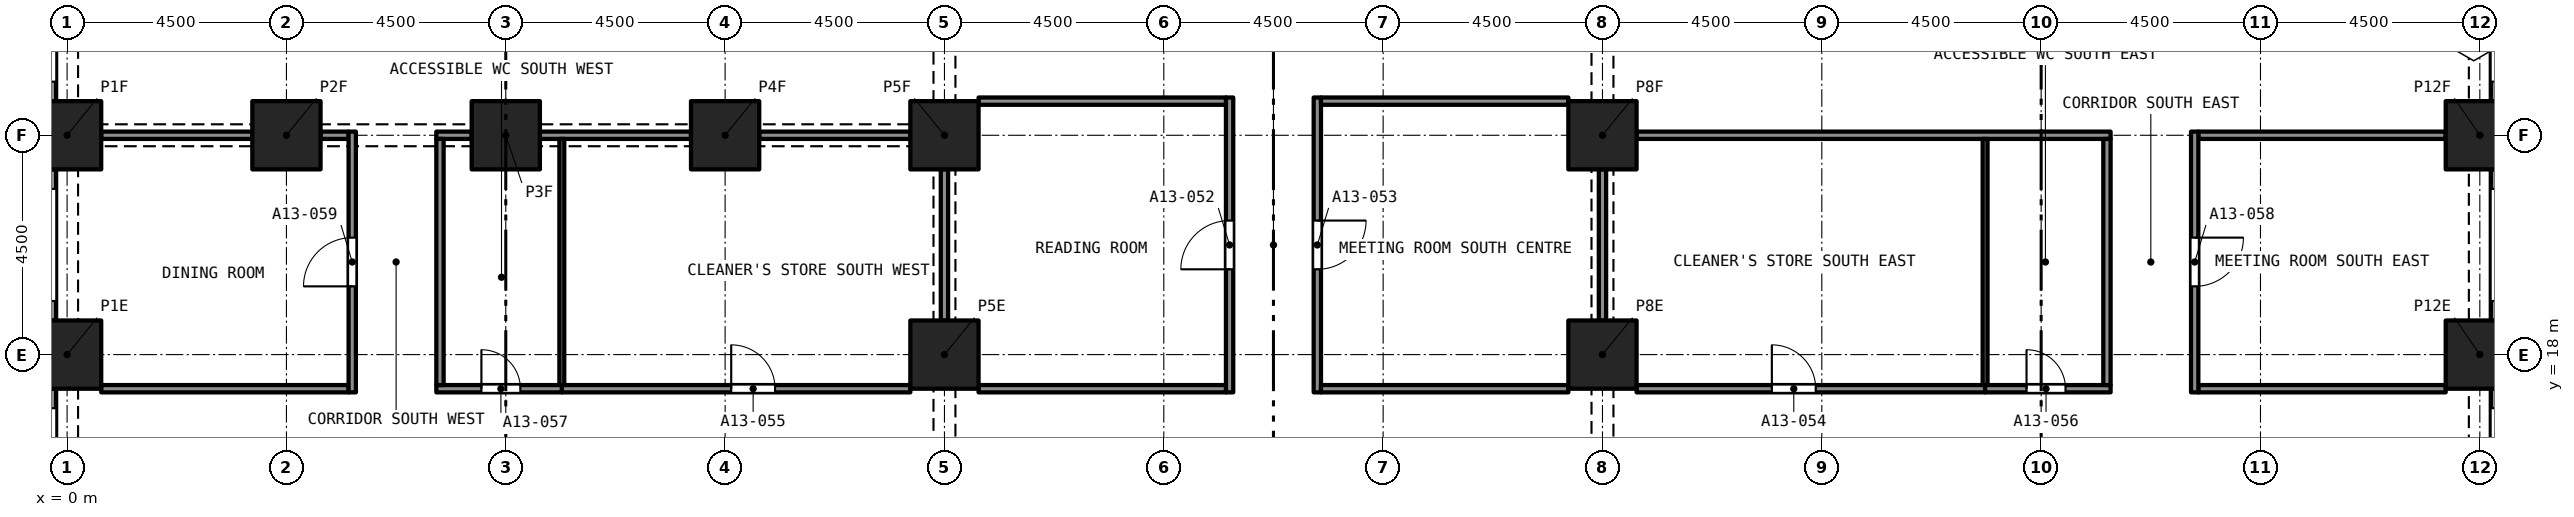
"""IFC4 building model, lengths in metres.
Left out: names, types, materials, properties, quantities, classifications, styles, units other than length and angle.
Written with IfcOpenShell. Run it as: python <this file> out.ifc"""

import sys

from ifc_helpers import new_model, si_unit, direction, frame, frame_2d, origin, origin_2d, place, context, subcontext, project, spatial, rectangle, extrude, element, fill, save


model = new_model("IFC4")
c1 = context("Model", 3, precision=1e-05, world=origin(), true_north=direction((0.0, 1.0)))
c2 = subcontext(c1, "Body", "Model", "MODEL_VIEW")
j1 = project(units=[si_unit("LENGTHUNIT", "METRE"), si_unit("PLANEANGLEUNIT", "RADIAN")], contexts=[c1])
p1 = place(None, origin())
s1 = spatial("IfcSite", under=j1, at=p1, CompositionType="ELEMENT")
p2 = place(p1, origin())
s2 = spatial("IfcBuilding", under=s1, at=p2, CompositionType="ELEMENT")
p3 = place(p2, frame((0.0, 0.0, 52.8)))
s3 = spatial("IfcBuildingStorey", under=s2, at=p3, CompositionType="ELEMENT", Elevation=52.8)
for number, where, z_axis, x_axis in (
    (1, (0.0, 18.0, 0.0), (0.0, 0.0, 1.0), (1.0, 0.0, 0.0)),
    (2, (18.0, 18.0, 0.0), (0.0, 0.0, 1.0), (1.0, 0.0, 0.0)),
    (3, (31.5, 18.0, 0.0), (0.0, 0.0, 1.0), (1.0, 0.0, 0.0)),
    (4, (49.5, 18.0, 0.0), (0.0, 0.0, 1.0), (1.0, 0.0, 0.0)),
    (5, (0.0, 22.5, 0.0), (0.0, 0.0, 1.0), (1.0, 0.0, 0.0)),
    (6, (4.5, 22.5, 0.0), (0.0, 0.0, 1.0), (1.0, 0.0, 0.0)),
    (7, (9.0, 22.5, 0.0), (0.0, 0.0, 1.0), (1.0, 0.0, 0.0)),
    (8, (13.5, 22.5, 0.0), (0.0, 0.0, 1.0), (1.0, 0.0, 0.0)),
    (9, (18.0, 22.5, 0.0), (0.0, 0.0, 1.0), (1.0, 0.0, 0.0)),
    (10, (31.5, 22.5, 0.0), (0.0, 0.0, 1.0), (1.0, 0.0, 0.0)),
    (11, (49.5, 22.5, 0.0), (0.0, 0.0, 1.0), (1.0, 0.0, 0.0)),
):
    element("IfcColumn", number, at=place(p3, frame(where, z_axis=z_axis, x_axis=x_axis)), inside=s3, PredefinedType="COLUMN", context=c2, shape_type="SweptSolid", body=[
        extrude(rectangle(XDim=1.4, YDim=1.4, at=origin_2d()), origin(), (0.0, 0.0, 1.0), 3.2),
    ])
p4 = place(p3, frame((49.875, 17.3, 0.0), z_axis=(0.0, 0.0, 1.0), x_axis=(0.0, -1.0, 0.0)))
e12 = element("IfcWall", 12, at=p4, inside=s3, PredefinedType="SOLIDWALL", context=c2, shape_type="SweptSolid", body=[
    extrude(rectangle(XDim=3.1, YDim=0.3, at=frame_2d((1.55, 0.0))), origin(), (0.0, 0.0, 1.0), 3.2),
])
p5 = place(p4, frame((0.4, 0.0, 0.45)))
e13 = element("IfcOpeningElement", 13, at=p5, cuts=e12, PredefinedType="OPENING", context=c2, shape_type="SweptSolid", body=[
    extrude(rectangle(XDim=2.3, YDim=1.95, at=frame_2d((1.15, 0.975))), frame((0.0, 0.16, 0.0), z_axis=(0.0, -1.0, 0.0), x_axis=(1.0, 0.0, 0.0)), (0.0, 0.0, 1.0), 0.32),
])
p6 = place(p3, frame((49.875, 21.8, 0.0), z_axis=(0.0, 0.0, 1.0), x_axis=(0.0, -1.0, 0.0)))
e14 = element("IfcWall", 14, at=p6, inside=s3, PredefinedType="SOLIDWALL", context=c2, shape_type="SweptSolid", body=[
    extrude(rectangle(XDim=3.1, YDim=0.3, at=frame_2d((1.55, 0.0))), origin(), (0.0, 0.0, 1.0), 3.2),
])
p7 = place(p6, frame((0.4, 0.0, 0.45)))
e15 = element("IfcOpeningElement", 15, at=p7, cuts=e14, PredefinedType="OPENING", context=c2, shape_type="SweptSolid", body=[
    extrude(rectangle(XDim=2.3, YDim=1.95, at=frame_2d((1.15, 0.975))), frame((0.0, 0.16, 0.0), z_axis=(0.0, -1.0, 0.0), x_axis=(1.0, 0.0, 0.0)), (0.0, 0.0, 1.0), 0.32),
])
p8 = place(p3, frame((49.875, 26.3, 0.0), z_axis=(0.0, 0.0, 1.0), x_axis=(0.0, -1.0, 0.0)))
e16 = element("IfcWall", 16, at=p8, inside=s3, PredefinedType="SOLIDWALL", context=c2, shape_type="SweptSolid", body=[
    extrude(rectangle(XDim=3.1, YDim=0.3, at=frame_2d((1.55, 0.0))), origin(), (0.0, 0.0, 1.0), 3.2),
])
p9 = place(p8, frame((0.4, 0.0, 0.45)))
e17 = element("IfcOpeningElement", 17, at=p9, cuts=e16, PredefinedType="OPENING", context=c2, shape_type="SweptSolid", body=[
    extrude(rectangle(XDim=2.3, YDim=1.95, at=frame_2d((1.15, 0.975))), frame((0.0, 0.16, 0.0), z_axis=(0.0, -1.0, 0.0), x_axis=(1.0, 0.0, 0.0)), (0.0, 0.0, 1.0), 0.32),
])
p10 = place(p3, frame((-0.375, 23.2, 0.0), z_axis=(0.0, 0.0, 1.0), x_axis=(0.0, 1.0, 0.0)))
e18 = element("IfcWall", 18, at=p10, inside=s3, PredefinedType="SOLIDWALL", context=c2, shape_type="SweptSolid", body=[
    extrude(rectangle(XDim=3.1, YDim=0.3, at=frame_2d((1.55, 0.0))), origin(), (0.0, 0.0, 1.0), 3.2),
])
p11 = place(p10, frame((0.4, 0.0, 0.45)))
e19 = element("IfcOpeningElement", 19, at=p11, cuts=e18, PredefinedType="OPENING", context=c2, shape_type="SweptSolid", body=[
    extrude(rectangle(XDim=2.3, YDim=1.95, at=frame_2d((1.15, 0.975))), frame((0.0, 0.16, 0.0), z_axis=(0.0, -1.0, 0.0), x_axis=(1.0, 0.0, 0.0)), (0.0, 0.0, 1.0), 0.32),
])
p12 = place(p3, frame((-0.375, 18.7, 0.0), z_axis=(0.0, 0.0, 1.0), x_axis=(0.0, 1.0, 0.0)))
e20 = element("IfcWall", 20, at=p12, inside=s3, PredefinedType="SOLIDWALL", context=c2, shape_type="SweptSolid", body=[
    extrude(rectangle(XDim=3.1, YDim=0.3, at=frame_2d((1.55, 0.0))), origin(), (0.0, 0.0, 1.0), 3.2),
])
p13 = place(p12, frame((0.4, 0.0, 0.45)))
e21 = element("IfcOpeningElement", 21, at=p13, cuts=e20, PredefinedType="OPENING", context=c2, shape_type="SweptSolid", body=[
    extrude(rectangle(XDim=2.3, YDim=1.95, at=frame_2d((1.15, 0.975))), frame((0.0, 0.16, 0.0), z_axis=(0.0, -1.0, 0.0), x_axis=(1.0, 0.0, 0.0)), (0.0, 0.0, 1.0), 0.32),
])
p14 = place(p3, frame((-0.375, 14.2, 0.0), z_axis=(0.0, 0.0, 1.0), x_axis=(0.0, 1.0, 0.0)))
e22 = element("IfcWall", 22, at=p14, inside=s3, PredefinedType="SOLIDWALL", context=c2, shape_type="SweptSolid", body=[
    extrude(rectangle(XDim=3.1, YDim=0.3, at=frame_2d((1.55, 0.0))), origin(), (0.0, 0.0, 1.0), 3.2),
])
p15 = place(p14, frame((0.4, 0.0, 0.45)))
e23 = element("IfcOpeningElement", 23, at=p15, cuts=e22, PredefinedType="OPENING", context=c2, shape_type="SweptSolid", body=[
    extrude(rectangle(XDim=2.3, YDim=1.95, at=frame_2d((1.15, 0.975))), frame((0.0, 0.16, 0.0), z_axis=(0.0, -1.0, 0.0), x_axis=(1.0, 0.0, 0.0)), (0.0, 0.0, 1.0), 0.32),
])
p16 = place(p3, frame((23.85, 17.225, 0.0), z_axis=(0.0, 0.0, 1.0), x_axis=(0.0, 1.0, 0.0)))
e24 = element("IfcWall", 24, at=p16, inside=s3, PredefinedType="PARTITIONING", context=c2, shape_type="SweptSolid", body=[
    extrude(rectangle(XDim=6.05, YDim=0.15, at=frame_2d((3.025, 0.0))), origin(), (0.0, 0.0, 1.0), 2.75),
])
p17 = place(p16, frame((2.525, 0.0, 0.0)))
e25 = element("IfcOpeningElement", 25, at=p17, cuts=e24, PredefinedType="OPENING", context=c2, shape_type="SweptSolid", body=[
    extrude(rectangle(XDim=1.0, YDim=2.1, at=frame_2d((0.5, 1.05))), frame((0.0, 0.085, 0.0), z_axis=(0.0, -1.0, 0.0), x_axis=(1.0, 0.0, 0.0)), (0.0, 0.0, 1.0), 0.17),
])
p18 = place(p3, frame((25.65, 23.275, 0.0), z_axis=(0.0, 0.0, 1.0), x_axis=(0.0, -1.0, 0.0)))
e26 = element("IfcWall", 26, at=p18, inside=s3, PredefinedType="PARTITIONING", context=c2, shape_type="SweptSolid", body=[
    extrude(rectangle(XDim=6.05, YDim=0.15, at=frame_2d((3.025, 0.0))), origin(), (0.0, 0.0, 1.0), 2.75),
])
p19 = place(p18, frame((2.525, 0.0, 0.0)))
e27 = element("IfcOpeningElement", 27, at=p19, cuts=e26, PredefinedType="OPENING", context=c2, shape_type="SweptSolid", body=[
    extrude(rectangle(XDim=1.0, YDim=2.1, at=frame_2d((0.5, 1.05))), frame((0.0, 0.085, 0.0), z_axis=(0.0, -1.0, 0.0), x_axis=(1.0, 0.0, 0.0)), (0.0, 0.0, 1.0), 0.17),
])
for number, where, z_axis, x_axis in (
    (28, (18.7, 17.3, 0.0), (0.0, 0.0, 1.0), (1.0, 0.0, 0.0)),
    (29, (25.725, 17.3, 0.0), (0.0, 0.0, 1.0), (1.0, 0.0, 0.0)),
):
    element("IfcWall", number, at=place(p3, frame(where, z_axis=z_axis, x_axis=x_axis)), inside=s3, PredefinedType="PARTITIONING", context=c2, shape_type="SweptSolid", body=[
        extrude(rectangle(XDim=5.075, YDim=0.15, at=frame_2d((2.538, 0.0))), origin(), (0.0, 0.0, 1.0), 2.75),
    ])
p20 = place(p3, frame((32.2, 17.3, 0.0), z_axis=(0.0, 0.0, 1.0), x_axis=(1.0, 0.0, 0.0)))
e30 = element("IfcWall", 30, at=p20, inside=s3, PredefinedType="PARTITIONING", context=c2, shape_type="SweptSolid", body=[
    extrude(rectangle(XDim=7.15, YDim=0.15, at=frame_2d((3.575, 0.0))), origin(), (0.0, 0.0, 1.0), 2.9),
])
p21 = place(p20, frame((2.775, 0.0, 0.0)))
e31 = element("IfcOpeningElement", 31, at=p21, cuts=e30, PredefinedType="OPENING", context=c2, shape_type="SweptSolid", body=[
    extrude(rectangle(XDim=0.9, YDim=2.1, at=frame_2d((0.45, 1.05))), frame((0.0, 0.085, 0.0), z_axis=(0.0, -1.0, 0.0), x_axis=(1.0, 0.0, 0.0)), (0.0, 0.0, 1.0), 0.17),
])
p22 = place(p3, frame((10.15, 17.3, 0.0), z_axis=(0.0, 0.0, 1.0), x_axis=(1.0, 0.0, 0.0)))
e32 = element("IfcWall", 32, at=p22, inside=s3, PredefinedType="PARTITIONING", context=c2, shape_type="SweptSolid", body=[
    extrude(rectangle(XDim=7.15, YDim=0.15, at=frame_2d((3.575, 0.0))), origin(), (0.0, 0.0, 1.0), 2.9),
])
p23 = place(p22, frame((3.475, 0.0, 0.0)))
e33 = element("IfcOpeningElement", 33, at=p23, cuts=e32, PredefinedType="OPENING", context=c2, shape_type="SweptSolid", body=[
    extrude(rectangle(XDim=0.9, YDim=2.1, at=frame_2d((0.45, 1.05))), frame((0.0, 0.085, 0.0), z_axis=(0.0, -1.0, 0.0), x_axis=(1.0, 0.0, 0.0)), (0.0, 0.0, 1.0), 0.17),
])
p24 = place(p3, frame((39.35, 17.3, 0.0), z_axis=(0.0, 0.0, 1.0), x_axis=(1.0, 0.0, 0.0)))
e34 = element("IfcWall", 34, at=p24, inside=s3, PredefinedType="PARTITIONING", context=c2, shape_type="SweptSolid", body=[
    extrude(rectangle(XDim=2.575, YDim=0.15, at=frame_2d((1.288, 0.0))), origin(), (0.0, 0.0, 1.0), 2.9),
])
p25 = place(p24, frame((0.85, 0.0, 0.0)))
e35 = element("IfcOpeningElement", 35, at=p25, cuts=e34, PredefinedType="OPENING", context=c2, shape_type="SweptSolid", body=[
    extrude(rectangle(XDim=0.8, YDim=2.1, at=frame_2d((0.4, 1.05))), frame((0.0, 0.085, 0.0), z_axis=(0.0, -1.0, 0.0), x_axis=(1.0, 0.0, 0.0)), (0.0, 0.0, 1.0), 0.17),
])
p26 = place(p3, frame((7.575, 17.3, 0.0), z_axis=(0.0, 0.0, 1.0), x_axis=(1.0, 0.0, 0.0)))
e36 = element("IfcWall", 36, at=p26, inside=s3, PredefinedType="PARTITIONING", context=c2, shape_type="SweptSolid", body=[
    extrude(rectangle(XDim=2.575, YDim=0.15, at=frame_2d((1.288, 0.0))), origin(), (0.0, 0.0, 1.0), 2.9),
])
p27 = place(p26, frame((0.925, 0.0, 0.0)))
e37 = element("IfcOpeningElement", 37, at=p27, cuts=e36, PredefinedType="OPENING", context=c2, shape_type="SweptSolid", body=[
    extrude(rectangle(XDim=0.8, YDim=2.1, at=frame_2d((0.4, 1.05))), frame((0.0, 0.085, 0.0), z_axis=(0.0, -1.0, 0.0), x_axis=(1.0, 0.0, 0.0)), (0.0, 0.0, 1.0), 0.17),
])
for number, where, z_axis, x_axis in (
    (38, (43.725, 17.3, 0.0), (0.0, 0.0, 1.0), (1.0, 0.0, 0.0)),
    (39, (0.7, 17.3, 0.0), (0.0, 0.0, 1.0), (1.0, 0.0, 0.0)),
):
    element("IfcWall", number, at=place(p3, frame(where, z_axis=z_axis, x_axis=x_axis)), inside=s3, PredefinedType="PARTITIONING", context=c2, shape_type="SweptSolid", body=[
        extrude(rectangle(XDim=5.075, YDim=0.15, at=frame_2d((2.538, 0.0))), origin(), (0.0, 0.0, 1.0), 2.9),
    ])
p28 = place(p3, frame((18.7, 23.2, 0.0), z_axis=(0.0, 0.0, 1.0), x_axis=(1.0, 0.0, 0.0)))
e40 = element("IfcWall", 40, at=p28, inside=s3, PredefinedType="PARTITIONING", context=c2, shape_type="SweptSolid", body=[
    extrude(rectangle(XDim=5.075, YDim=0.15, at=frame_2d((2.538, 0.0))), origin(), (0.0, 0.0, 1.0), 2.75),
])
p29 = place(p3, frame((18.0, 18.7, 0.0), z_axis=(0.0, 0.0, 1.0), x_axis=(0.0, 1.0, 0.0)))
e41 = element("IfcWall", 41, at=p29, inside=s3, PredefinedType="PARTITIONING", context=c2, shape_type="SweptSolid", body=[
    extrude(rectangle(XDim=3.1, YDim=0.15, at=frame_2d((1.55, 0.0))), origin(), (0.0, 0.0, 1.0), 2.38),
])
p30 = place(p3, frame((25.725, 23.2, 0.0), z_axis=(0.0, 0.0, 1.0), x_axis=(1.0, 0.0, 0.0)))
e42 = element("IfcWall", 42, at=p30, inside=s3, PredefinedType="PARTITIONING", context=c2, shape_type="SweptSolid", body=[
    extrude(rectangle(XDim=5.075, YDim=0.15, at=frame_2d((2.538, 0.0))), origin(), (0.0, 0.0, 1.0), 2.75),
])
p31 = place(p3, frame((31.5, 18.7, 0.0), z_axis=(0.0, 0.0, 1.0), x_axis=(0.0, 1.0, 0.0)))
e43 = element("IfcWall", 43, at=p31, inside=s3, PredefinedType="PARTITIONING", context=c2, shape_type="SweptSolid", body=[
    extrude(rectangle(XDim=3.1, YDim=0.15, at=frame_2d((1.55, 0.0))), origin(), (0.0, 0.0, 1.0), 2.38),
])
p32 = place(p3, frame((32.2, 22.5, 0.0), z_axis=(0.0, 0.0, 1.0), x_axis=(1.0, 0.0, 0.0)))
e44 = element("IfcWall", 44, at=p32, inside=s3, PredefinedType="PARTITIONING", context=c2, shape_type="SweptSolid", body=[
    extrude(rectangle(XDim=9.725, YDim=0.15, at=frame_2d((4.863, 0.0))), origin(), (0.0, 0.0, 1.0), 2.9),
])
p33 = place(p3, frame((43.725, 22.5, 0.0), z_axis=(0.0, 0.0, 1.0), x_axis=(1.0, 0.0, 0.0)))
e45 = element("IfcWall", 45, at=p33, inside=s3, PredefinedType="PARTITIONING", context=c2, shape_type="SweptSolid", body=[
    extrude(rectangle(XDim=5.075, YDim=0.15, at=frame_2d((2.538, 0.0))), origin(), (0.0, 0.0, 1.0), 2.9),
])
for number, where, z_axis, x_axis in (
    (46, (14.2, 22.5, 0.0), (0.0, 0.0, 1.0), (1.0, 0.0, 0.0)),
    (47, (9.7, 22.5, 0.0), (0.0, 0.0, 1.0), (1.0, 0.0, 0.0)),
):
    element("IfcWall", number, at=place(p3, frame(where, z_axis=z_axis, x_axis=x_axis)), inside=s3, PredefinedType="PARTITIONING", context=c2, shape_type="SweptSolid", body=[
        extrude(rectangle(XDim=3.1, YDim=0.15, at=frame_2d((1.55, 0.0))), origin(), (0.0, 0.0, 1.0), 2.38),
    ])
p34 = place(p3, frame((7.575, 22.5, 0.0), z_axis=(0.0, 0.0, 1.0), x_axis=(1.0, 0.0, 0.0)))
e48 = element("IfcWall", 48, at=p34, inside=s3, PredefinedType="PARTITIONING", context=c2, shape_type="SweptSolid", body=[
    extrude(rectangle(XDim=0.725, YDim=0.15, at=frame_2d((0.363, 0.0))), origin(), (0.0, 0.0, 1.0), 2.38),
])
p35 = place(p3, frame((5.2, 22.5, 0.0), z_axis=(0.0, 0.0, 1.0), x_axis=(1.0, 0.0, 0.0)))
e49 = element("IfcWall", 49, at=p35, inside=s3, PredefinedType="PARTITIONING", context=c2, shape_type="SweptSolid", body=[
    extrude(rectangle(XDim=0.575, YDim=0.15, at=frame_2d((0.288, 0.0))), origin(), (0.0, 0.0, 1.0), 2.38),
])
p36 = place(p3, frame((0.7, 22.5, 0.0), z_axis=(0.0, 0.0, 1.0), x_axis=(1.0, 0.0, 0.0)))
e50 = element("IfcWall", 50, at=p36, inside=s3, PredefinedType="PARTITIONING", context=c2, shape_type="SweptSolid", body=[
    extrude(rectangle(XDim=3.1, YDim=0.15, at=frame_2d((1.55, 0.0))), origin(), (0.0, 0.0, 1.0), 2.38),
])
p37 = place(p3, frame((41.85, 17.375, 0.0), z_axis=(0.0, 0.0, 1.0), x_axis=(0.0, 1.0, 0.0)))
e51 = element("IfcWall", 51, at=p37, inside=s3, PredefinedType="PARTITIONING", context=c2, shape_type="SweptSolid", body=[
    extrude(rectangle(XDim=5.05, YDim=0.15, at=frame_2d((2.525, 0.0))), origin(), (0.0, 0.0, 1.0), 2.9),
])
p38 = place(p3, frame((43.65, 22.575, 0.0), z_axis=(0.0, 0.0, 1.0), x_axis=(0.0, -1.0, 0.0)))
e52 = element("IfcWall", 52, at=p38, inside=s3, PredefinedType="PARTITIONING", context=c2, shape_type="SweptSolid", body=[
    extrude(rectangle(XDim=5.35, YDim=0.15, at=frame_2d((2.675, 0.0))), origin(), (0.0, 0.0, 1.0), 2.9),
])
p39 = place(p38, frame((2.175, 0.0, 0.0)))
e53 = element("IfcOpeningElement", 53, at=p39, cuts=e52, PredefinedType="OPENING", context=c2, shape_type="SweptSolid", body=[
    extrude(rectangle(XDim=1.0, YDim=2.1, at=frame_2d((0.5, 1.05))), frame((0.0, 0.085, 0.0), z_axis=(0.0, -1.0, 0.0), x_axis=(1.0, 0.0, 0.0)), (0.0, 0.0, 1.0), 0.17),
])
p40 = place(p3, frame((7.65, 17.375, 0.0), z_axis=(0.0, 0.0, 1.0), x_axis=(0.0, 1.0, 0.0)))
e54 = element("IfcWall", 54, at=p40, inside=s3, PredefinedType="PARTITIONING", context=c2, shape_type="SweptSolid", body=[
    extrude(rectangle(XDim=5.05, YDim=0.15, at=frame_2d((2.525, 0.0))), origin(), (0.0, 0.0, 1.0), 2.9),
])
p41 = place(p3, frame((5.85, 17.225, 0.0), z_axis=(0.0, 0.0, 1.0), x_axis=(0.0, 1.0, 0.0)))
e55 = element("IfcWall", 55, at=p41, inside=s3, PredefinedType="PARTITIONING", context=c2, shape_type="SweptSolid", body=[
    extrude(rectangle(XDim=5.35, YDim=0.15, at=frame_2d((2.675, 0.0))), origin(), (0.0, 0.0, 1.0), 2.9),
])
p42 = place(p41, frame((2.175, 0.0, 0.0)))
e56 = element("IfcOpeningElement", 56, at=p42, cuts=e55, PredefinedType="OPENING", context=c2, shape_type="SweptSolid", body=[
    extrude(rectangle(XDim=1.0, YDim=2.1, at=frame_2d((0.5, 1.05))), frame((0.0, 0.085, 0.0), z_axis=(0.0, -1.0, 0.0), x_axis=(1.0, 0.0, 0.0)), (0.0, 0.0, 1.0), 0.17),
])
for number, where, z_axis, x_axis in (
    (57, (39.35, 17.375, 0.0), (0.0, 0.0, 1.0), (0.0, 1.0, 0.0)),
    (58, (10.15, 17.375, 0.0), (0.0, 0.0, 1.0), (0.0, 1.0, 0.0)),
):
    element("IfcWall", number, at=place(p3, frame(where, z_axis=z_axis, x_axis=x_axis)), inside=s3, PredefinedType="PARTITIONING", context=c2, shape_type="SweptSolid", body=[
        extrude(rectangle(XDim=5.05, YDim=0.1, at=frame_2d((2.525, 0.0))), origin(), (0.0, 0.0, 1.0), 2.9),
    ])
p43 = place(p17, origin())
e59 = element("IfcDoor", 59, at=p43, inside=s3, OperationType="SINGLE_SWING_RIGHT", PredefinedType="DOOR", context=c2, shape_type="SweptSolid", body=[
    extrude(rectangle(XDim=1.0, YDim=2.1, at=frame_2d((0.5, 1.05))), frame((0.0, 0.025, 0.0), z_axis=(0.0, -1.0, 0.0), x_axis=(1.0, 0.0, 0.0)), (0.0, 0.0, 1.0), 0.05),
])
fill(e25, e59)
p44 = place(p19, origin())
e60 = element("IfcDoor", 60, at=p44, inside=s3, OperationType="SINGLE_SWING_RIGHT", PredefinedType="DOOR", context=c2, shape_type="SweptSolid", body=[
    extrude(rectangle(XDim=1.0, YDim=2.1, at=frame_2d((0.5, 1.05))), frame((0.0, 0.025, 0.0), z_axis=(0.0, -1.0, 0.0), x_axis=(1.0, 0.0, 0.0)), (0.0, 0.0, 1.0), 0.05),
])
fill(e27, e60)
p45 = place(p21, origin())
e61 = element("IfcDoor", 61, at=p45, inside=s3, OperationType="SINGLE_SWING_LEFT", PredefinedType="DOOR", context=c2, shape_type="SweptSolid", body=[
    extrude(rectangle(XDim=0.9, YDim=2.1, at=frame_2d((0.45, 1.05))), frame((0.0, 0.025, 0.0), z_axis=(0.0, -1.0, 0.0), x_axis=(1.0, 0.0, 0.0)), (0.0, 0.0, 1.0), 0.05),
])
fill(e31, e61)
p46 = place(p23, origin())
e62 = element("IfcDoor", 62, at=p46, inside=s3, OperationType="SINGLE_SWING_RIGHT", PredefinedType="DOOR", context=c2, shape_type="SweptSolid", body=[
    extrude(rectangle(XDim=0.9, YDim=2.1, at=frame_2d((0.45, 1.05))), frame((0.0, 0.025, 0.0), z_axis=(0.0, -1.0, 0.0), x_axis=(1.0, 0.0, 0.0)), (0.0, 0.0, 1.0), 0.05),
])
fill(e33, e62)
p47 = place(p25, origin())
e63 = element("IfcDoor", 63, at=p47, inside=s3, OperationType="SINGLE_SWING_LEFT", PredefinedType="DOOR", context=c2, shape_type="SweptSolid", body=[
    extrude(rectangle(XDim=0.8, YDim=2.1, at=frame_2d((0.4, 1.05))), frame((0.0, 0.025, 0.0), z_axis=(0.0, -1.0, 0.0), x_axis=(1.0, 0.0, 0.0)), (0.0, 0.0, 1.0), 0.05),
])
fill(e35, e63)
p48 = place(p27, origin())
e64 = element("IfcDoor", 64, at=p48, inside=s3, OperationType="SINGLE_SWING_RIGHT", PredefinedType="DOOR", context=c2, shape_type="SweptSolid", body=[
    extrude(rectangle(XDim=0.8, YDim=2.1, at=frame_2d((0.4, 1.05))), frame((0.0, 0.025, 0.0), z_axis=(0.0, -1.0, 0.0), x_axis=(1.0, 0.0, 0.0)), (0.0, 0.0, 1.0), 0.05),
])
fill(e37, e64)
p49 = place(p39, origin())
e65 = element("IfcDoor", 65, at=p49, inside=s3, OperationType="SINGLE_SWING_RIGHT", PredefinedType="DOOR", context=c2, shape_type="SweptSolid", body=[
    extrude(rectangle(XDim=1.0, YDim=2.1, at=frame_2d((0.5, 1.05))), frame((0.0, 0.025, 0.0), z_axis=(0.0, -1.0, 0.0), x_axis=(1.0, 0.0, 0.0)), (0.0, 0.0, 1.0), 0.05),
])
fill(e53, e65)
p50 = place(p42, origin())
e66 = element("IfcDoor", 66, at=p50, inside=s3, OperationType="SINGLE_SWING_LEFT", PredefinedType="DOOR", context=c2, shape_type="SweptSolid", body=[
    extrude(rectangle(XDim=1.0, YDim=2.1, at=frame_2d((0.5, 1.05))), frame((0.0, 0.025, 0.0), z_axis=(0.0, -1.0, 0.0), x_axis=(1.0, 0.0, 0.0)), (0.0, 0.0, 1.0), 0.05),
])
fill(e56, e66)
save(model, sys.argv[1])
